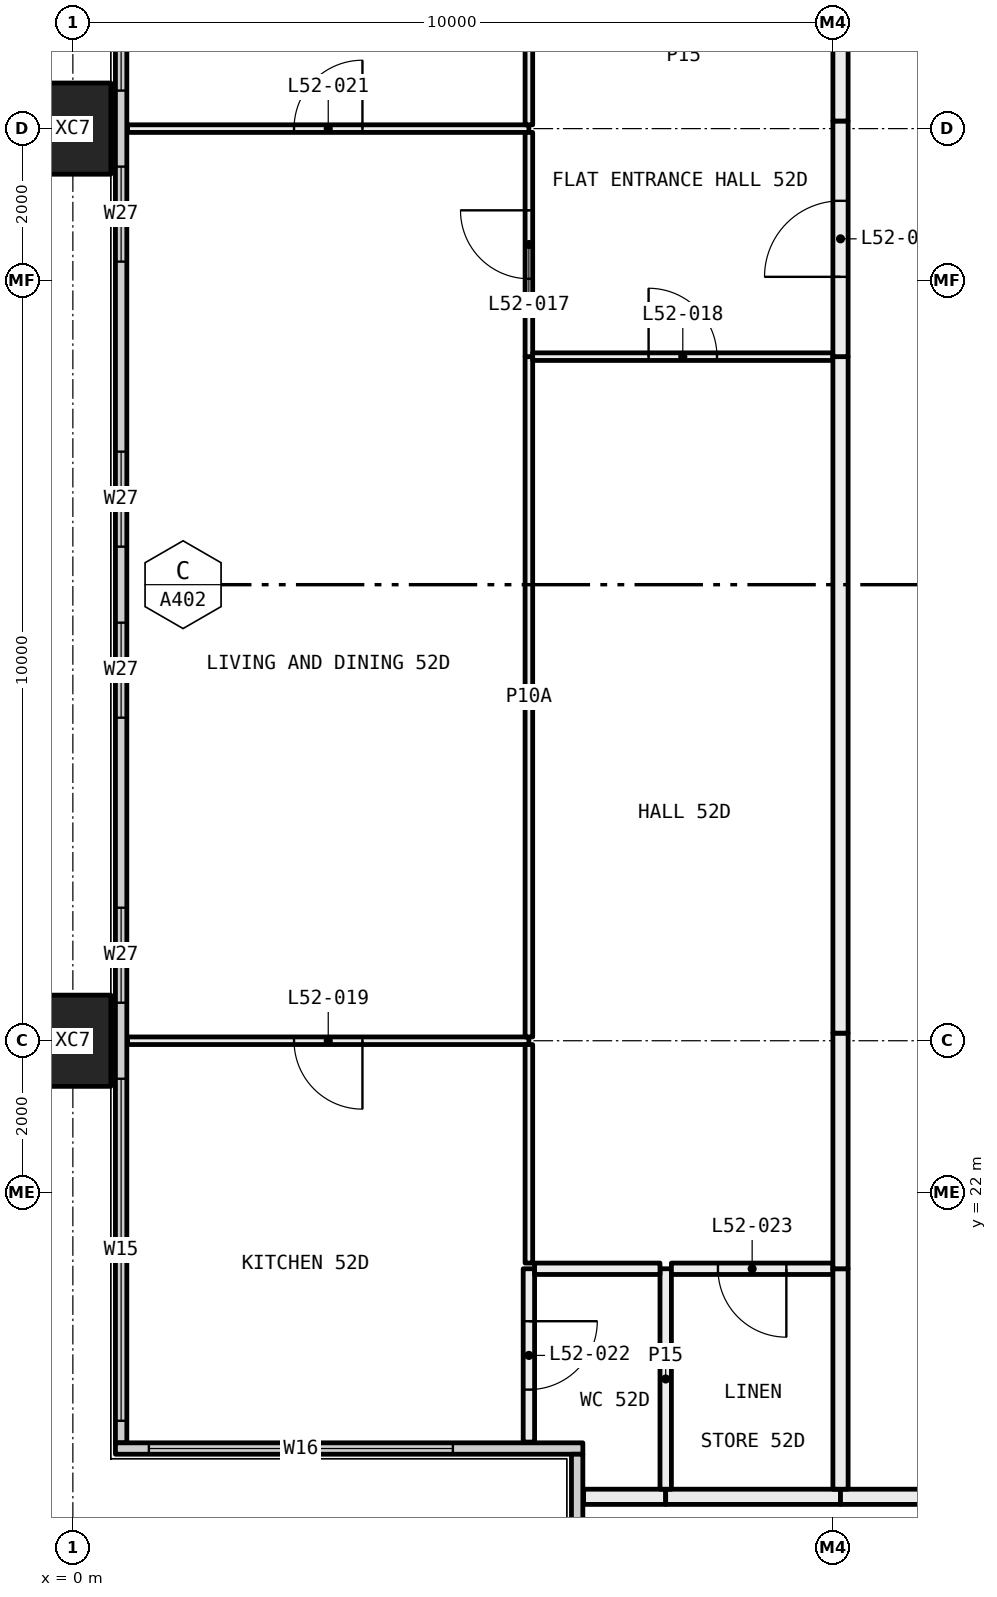
"""IFC4 building model, lengths in metres.
Left out: names, types, materials, properties, quantities, classifications, styles, units other than length and angle.
Written with IfcOpenShell. Run it as: python <this file> out.ifc"""

import sys

from ifc_helpers import new_model, si_unit, direction, frame, frame_2d, origin, origin_2d, place, context, subcontext, project, spatial, rectangle, hollow_rectangle, extrude, element, fill, save


model = new_model("IFC4")
c1 = context("Model", 3, precision=1e-05, world=origin(), true_north=direction((0.0, 1.0)))
c2 = subcontext(c1, "Body", "Model", "MODEL_VIEW")
j1 = project(units=[si_unit("LENGTHUNIT", "METRE"), si_unit("PLANEANGLEUNIT", "RADIAN")], contexts=[c1])
p1 = place(None, origin())
s1 = spatial("IfcSite", under=j1, at=p1, CompositionType="ELEMENT")
p2 = place(p1, origin())
s2 = spatial("IfcBuilding", under=s1, at=p2, CompositionType="ELEMENT")
p3 = place(p2, frame((0.0, 0.0, 196.2)))
s3 = spatial("IfcBuildingStorey", under=s2, at=p3, CompositionType="ELEMENT", Elevation=196.2)
for number, where, z_axis, x_axis in (
    (1, (0.0, 24.0, -0.4), (0.0, 0.0, 1.0), (0.0, 1.0, 0.0)),
    (2, (0.0, 36.0, -0.4), (0.0, 0.0, 1.0), (0.0, 1.0, 0.0)),
):
    element("IfcColumn", number, at=place(p3, frame(where, z_axis=z_axis, x_axis=x_axis)), inside=s3, PredefinedType="COLUMN", context=c2, shape_type="SweptSolid", body=[
        extrude(hollow_rectangle(XDim=1.2, YDim=1.0, WallThickness=0.045, at=origin_2d()), origin(), (0.0, 0.0, 1.0), 3.45),
    ])
p4 = place(p3, frame((0.635, 18.71, 0.0), z_axis=(0.0, 0.0, 1.0), x_axis=(0.0, 1.0, 0.0)))
e3 = element("IfcWall", 3, at=p4, inside=s3, PredefinedType="ELEMENTEDWALL", context=c2, shape_type="SweptSolid", body=[
    extrude(rectangle(XDim=22.58, YDim=0.15, at=frame_2d((11.29, 0.0))), origin(), (0.0, 0.0, 1.0), 3.05),
])
p5 = place(p4, frame((0.29, 0.0, 0.45)))
e4 = element("IfcOpeningElement", 4, at=p5, cuts=e3, PredefinedType="OPENING", context=c2, shape_type="SweptSolid", body=[
    extrude(rectangle(XDim=4.5, YDim=2.55, at=frame_2d((2.25, 1.275))), frame((0.0, 0.085, 0.0), z_axis=(0.0, -1.0, 0.0), x_axis=(1.0, 0.0, 0.0)), (0.0, 0.0, 1.0), 0.17),
])
p6 = place(p4, frame((5.79, 0.0, 0.45)))
e5 = element("IfcOpeningElement", 5, at=p6, cuts=e3, PredefinedType="OPENING", context=c2, shape_type="SweptSolid", body=[
    extrude(rectangle(XDim=1.25, YDim=2.55, at=frame_2d((0.625, 1.275))), frame((0.0, 0.085, 0.0), z_axis=(0.0, -1.0, 0.0), x_axis=(1.0, 0.0, 0.0)), (0.0, 0.0, 1.0), 0.17),
])
p7 = place(p4, frame((9.54, 0.0, 0.45)))
e6 = element("IfcOpeningElement", 6, at=p7, cuts=e3, PredefinedType="OPENING", context=c2, shape_type="SweptSolid", body=[
    extrude(rectangle(XDim=1.25, YDim=2.55, at=frame_2d((0.625, 1.275))), frame((0.0, 0.085, 0.0), z_axis=(0.0, -1.0, 0.0), x_axis=(1.0, 0.0, 0.0)), (0.0, 0.0, 1.0), 0.17),
])
p8 = place(p4, frame((11.79, 0.0, 0.45)))
e7 = element("IfcOpeningElement", 7, at=p8, cuts=e3, PredefinedType="OPENING", context=c2, shape_type="SweptSolid", body=[
    extrude(rectangle(XDim=1.25, YDim=2.55, at=frame_2d((0.625, 1.275))), frame((0.0, 0.085, 0.0), z_axis=(0.0, -1.0, 0.0), x_axis=(1.0, 0.0, 0.0)), (0.0, 0.0, 1.0), 0.17),
])
p9 = place(p4, frame((15.54, 0.0, 0.45)))
e8 = element("IfcOpeningElement", 8, at=p9, cuts=e3, PredefinedType="OPENING", context=c2, shape_type="SweptSolid", body=[
    extrude(rectangle(XDim=1.25, YDim=2.55, at=frame_2d((0.625, 1.275))), frame((0.0, 0.085, 0.0), z_axis=(0.0, -1.0, 0.0), x_axis=(1.0, 0.0, 0.0)), (0.0, 0.0, 1.0), 0.17),
])
p10 = place(p4, frame((17.79, 0.0, 0.45)))
e9 = element("IfcOpeningElement", 9, at=p10, cuts=e3, PredefinedType="OPENING", context=c2, shape_type="SweptSolid", body=[
    extrude(rectangle(XDim=4.5, YDim=2.55, at=frame_2d((2.25, 1.275))), frame((0.0, 0.085, 0.0), z_axis=(0.0, -1.0, 0.0), x_axis=(1.0, 0.0, 0.0)), (0.0, 0.0, 1.0), 0.17),
])
p11 = place(p3, frame((0.56, 18.635, 0.0), z_axis=(0.0, 0.0, 1.0), x_axis=(1.0, 0.0, 0.0)))
e10 = element("IfcWall", 10, at=p11, inside=s3, PredefinedType="ELEMENTEDWALL", context=c2, shape_type="SweptSolid", body=[
    extrude(rectangle(XDim=6.15, YDim=0.15, at=frame_2d((3.075, 0.0))), origin(), (0.0, 0.0, 1.0), 3.05),
])
p12 = place(p11, frame((0.44, 0.0, 0.45)))
e11 = element("IfcOpeningElement", 11, at=p12, cuts=e10, PredefinedType="OPENING", context=c2, shape_type="SweptSolid", body=[
    extrude(rectangle(XDim=4.0, YDim=2.55, at=frame_2d((2.0, 1.275))), frame((0.0, 0.085, 0.0), z_axis=(0.0, -1.0, 0.0), x_axis=(1.0, 0.0, 0.0)), (0.0, 0.0, 1.0), 0.17),
])
p13 = place(p3, frame((6.635, 12.71, 0.0), z_axis=(0.0, 0.0, 1.0), x_axis=(0.0, 1.0, 0.0)))
e12 = element("IfcWall", 12, at=p13, inside=s3, PredefinedType="ELEMENTEDWALL", context=c2, shape_type="SweptSolid", body=[
    extrude(rectangle(XDim=5.85, YDim=0.15, at=frame_2d((2.925, 0.0))), origin(), (0.0, 0.0, 1.0), 3.05),
])
p14 = place(p13, frame((0.29, 0.0, 0.45)))
e13 = element("IfcOpeningElement", 13, at=p14, cuts=e12, PredefinedType="OPENING", context=c2, shape_type="SweptSolid", body=[
    extrude(rectangle(XDim=4.0, YDim=2.55, at=frame_2d((2.0, 1.275))), frame((0.0, 0.085, 0.0), z_axis=(0.0, -1.0, 0.0), x_axis=(1.0, 0.0, 0.0)), (0.0, 0.0, 1.0), 0.17),
])
p15 = place(p3, frame((7.8, 18.0, 0.0), z_axis=(0.0, 0.0, 1.0), x_axis=(-1.0, 0.0, 0.0)))
e14 = element("IfcWall", 14, at=p15, inside=s3, PredefinedType="PARTITIONING", context=c2, shape_type="SweptSolid", body=[
    extrude(rectangle(XDim=1.08, YDim=0.2, at=frame_2d((0.54, 0.0))), origin(), (0.0, 0.0, 1.0), 3.05),
])
p16 = place(p3, frame((10.1, 18.0, 0.0), z_axis=(0.0, 0.0, 1.0), x_axis=(-1.0, 0.0, 0.0)))
e15 = element("IfcWall", 15, at=p16, inside=s3, PredefinedType="PARTITIONING", context=c2, shape_type="SweptSolid", body=[
    extrude(rectangle(XDim=2.3, YDim=0.2, at=frame_2d((1.15, 0.0))), origin(), (0.0, 0.0, 1.0), 3.05),
])
p17 = place(p3, frame((12.0, 18.0, 0.0), z_axis=(0.0, 0.0, 1.0), x_axis=(-1.0, 0.0, 0.0)))
e16 = element("IfcWall", 16, at=p17, inside=s3, PredefinedType="PARTITIONING", context=c2, shape_type="SweptSolid", body=[
    extrude(rectangle(XDim=1.9, YDim=0.2, at=frame_2d((0.95, 0.0))), origin(), (0.0, 0.0, 1.0), 3.05),
])
p18 = place(p3, frame((6.0, 24.0, 0.0), z_axis=(0.0, 0.0, 1.0), x_axis=(-1.0, 0.0, 0.0)))
e17 = element("IfcWall", 17, at=p18, inside=s3, PredefinedType="PARTITIONING", context=c2, shape_type="SweptSolid", body=[
    extrude(rectangle(XDim=5.28, YDim=0.1, at=frame_2d((2.64, 0.0))), origin(), (0.0, 0.0, 1.0), 2.45),
])
p19 = place(p18, frame((2.19, 0.0, 0.0)))
e18 = element("IfcOpeningElement", 18, at=p19, cuts=e17, PredefinedType="OPENING", context=c2, shape_type="SweptSolid", body=[
    extrude(rectangle(XDim=0.9, YDim=2.1, at=frame_2d((0.45, 1.05))), frame((0.0, 0.06, 0.0), z_axis=(0.0, -1.0, 0.0), x_axis=(1.0, 0.0, 0.0)), (0.0, 0.0, 1.0), 0.12),
])
p20 = place(p3, frame((6.0, 18.72, 0.0), z_axis=(0.0, 0.0, 1.0), x_axis=(0.0, 1.0, 0.0)))
e19 = element("IfcWall", 19, at=p20, inside=s3, PredefinedType="PARTITIONING", context=c2, shape_type="SweptSolid", body=[
    extrude(rectangle(XDim=2.28, YDim=0.15, at=frame_2d((1.14, 0.0))), origin(), (0.0, 0.0, 1.0), 3.05),
])
p21 = place(p20, frame((0.69, 0.0, 0.0)))
e20 = element("IfcOpeningElement", 20, at=p21, cuts=e19, PredefinedType="OPENING", context=c2, shape_type="SweptSolid", body=[
    extrude(rectangle(XDim=0.9, YDim=2.1, at=frame_2d((0.45, 1.05))), frame((0.0, 0.085, 0.0), z_axis=(0.0, -1.0, 0.0), x_axis=(1.0, 0.0, 0.0)), (0.0, 0.0, 1.0), 0.17),
])
p22 = place(p3, frame((6.0, 21.075, 0.0), z_axis=(0.0, 0.0, 1.0), x_axis=(0.0, 1.0, 0.0)))
e21 = element("IfcWall", 21, at=p22, inside=s3, PredefinedType="PARTITIONING", context=c2, shape_type="SweptSolid", body=[
    extrude(rectangle(XDim=2.875, YDim=0.1, at=frame_2d((1.438, 0.0))), origin(), (0.0, 0.0, 1.0), 2.45),
])
p23 = place(p3, frame((6.0, 36.0, 0.0), z_axis=(0.0, 0.0, 1.0), x_axis=(-1.0, 0.0, 0.0)))
e22 = element("IfcWall", 22, at=p23, inside=s3, PredefinedType="PARTITIONING", context=c2, shape_type="SweptSolid", body=[
    extrude(rectangle(XDim=5.28, YDim=0.1, at=frame_2d((2.64, 0.0))), origin(), (0.0, 0.0, 1.0), 2.45),
])
p24 = place(p23, frame((2.19, 0.0, 0.0)))
e23 = element("IfcOpeningElement", 23, at=p24, cuts=e22, PredefinedType="OPENING", context=c2, shape_type="SweptSolid", body=[
    extrude(rectangle(XDim=0.9, YDim=2.1, at=frame_2d((0.45, 1.05))), frame((0.0, 0.06, 0.0), z_axis=(0.0, -1.0, 0.0), x_axis=(1.0, 0.0, 0.0)), (0.0, 0.0, 1.0), 0.12),
])
p25 = place(p3, frame((6.0, 24.05, 0.0), z_axis=(0.0, 0.0, 1.0), x_axis=(0.0, 1.0, 0.0)))
e24 = element("IfcWall", 24, at=p25, inside=s3, PredefinedType="PARTITIONING", context=c2, shape_type="SweptSolid", body=[
    extrude(rectangle(XDim=8.95, YDim=0.1, at=frame_2d((4.475, 0.0))), origin(), (0.0, 0.0, 1.0), 2.45),
])
p26 = place(p3, frame((6.0, 33.0, 0.0), z_axis=(0.0, 0.0, 1.0), x_axis=(0.0, 1.0, 0.0)))
e25 = element("IfcWall", 25, at=p26, inside=s3, PredefinedType="PARTITIONING", context=c2, shape_type="SweptSolid", body=[
    extrude(rectangle(XDim=2.95, YDim=0.1, at=frame_2d((1.475, 0.0))), origin(), (0.0, 0.0, 1.0), 2.45),
])
p27 = place(p26, frame((1.025, 0.0, 0.0)))
e26 = element("IfcOpeningElement", 26, at=p27, cuts=e25, PredefinedType="OPENING", context=c2, shape_type="SweptSolid", body=[
    extrude(rectangle(XDim=0.9, YDim=2.1, at=frame_2d((0.45, 1.05))), frame((0.0, 0.06, 0.0), z_axis=(0.0, -1.0, 0.0), x_axis=(1.0, 0.0, 0.0)), (0.0, 0.0, 1.0), 0.12),
])
p28 = place(p3, frame((6.0, 36.05, 0.0), z_axis=(0.0, 0.0, 1.0), x_axis=(0.0, 1.0, 0.0)))
e27 = element("IfcWall", 27, at=p28, inside=s3, PredefinedType="PARTITIONING", context=c2, shape_type="SweptSolid", body=[
    extrude(rectangle(XDim=1.375, YDim=0.1, at=frame_2d((0.688, 0.0))), origin(), (0.0, 0.0, 1.0), 2.45),
])
p29 = place(p3, frame((7.8, 18.1, 0.0), z_axis=(0.0, 0.0, 1.0), x_axis=(0.0, 1.0, 0.0)))
e28 = element("IfcWall", 28, at=p29, inside=s3, PredefinedType="PARTITIONING", context=c2, shape_type="SweptSolid", body=[
    extrude(rectangle(XDim=2.9, YDim=0.15, at=frame_2d((1.45, 0.0))), origin(), (0.0, 0.0, 1.0), 3.05),
])
p30 = place(p3, frame((7.725, 21.0, 0.0), z_axis=(0.0, 0.0, 1.0), x_axis=(-1.0, 0.0, 0.0)))
e29 = element("IfcWall", 29, at=p30, inside=s3, PredefinedType="PARTITIONING", context=c2, shape_type="SweptSolid", body=[
    extrude(rectangle(XDim=1.65, YDim=0.15, at=frame_2d((0.825, 0.0))), origin(), (0.0, 0.0, 1.0), 3.05),
])
p31 = place(p3, frame((10.0, 21.0, 0.0), z_axis=(0.0, 0.0, 1.0), x_axis=(-1.0, 0.0, 0.0)))
e30 = element("IfcWall", 30, at=p31, inside=s3, PredefinedType="PARTITIONING", context=c2, shape_type="SweptSolid", body=[
    extrude(rectangle(XDim=2.125, YDim=0.15, at=frame_2d((1.062, 0.0))), origin(), (0.0, 0.0, 1.0), 3.05),
])
p32 = place(p31, frame((0.613, 0.0, 0.0)))
e31 = element("IfcOpeningElement", 31, at=p32, cuts=e30, PredefinedType="OPENING", context=c2, shape_type="SweptSolid", body=[
    extrude(rectangle(XDim=0.9, YDim=2.1, at=frame_2d((0.45, 1.05))), frame((0.0, 0.085, 0.0), z_axis=(0.0, -1.0, 0.0), x_axis=(1.0, 0.0, 0.0)), (0.0, 0.0, 1.0), 0.17),
])
p33 = place(p3, frame((10.1, 18.1, 0.0), z_axis=(0.0, 0.0, 1.0), x_axis=(0.0, 1.0, 0.0)))
e32 = element("IfcWall", 32, at=p33, inside=s3, PredefinedType="PARTITIONING", context=c2, shape_type="SweptSolid", body=[
    extrude(rectangle(XDim=2.9, YDim=0.2, at=frame_2d((1.45, 0.0))), origin(), (0.0, 0.0, 1.0), 3.05),
])
p34 = place(p3, frame((10.0, 33.0, 0.0), z_axis=(0.0, 0.0, 1.0), x_axis=(-1.0, 0.0, 0.0)))
e33 = element("IfcWall", 33, at=p34, inside=s3, PredefinedType="PARTITIONING", context=c2, shape_type="SweptSolid", body=[
    extrude(rectangle(XDim=3.95, YDim=0.1, at=frame_2d((1.975, 0.0))), origin(), (0.0, 0.0, 1.0), 3.05),
])
p35 = place(p34, frame((1.525, 0.0, 0.0)))
e34 = element("IfcOpeningElement", 34, at=p35, cuts=e33, PredefinedType="OPENING", context=c2, shape_type="SweptSolid", body=[
    extrude(rectangle(XDim=0.9, YDim=2.1, at=frame_2d((0.45, 1.05))), frame((0.0, 0.06, 0.0), z_axis=(0.0, -1.0, 0.0), x_axis=(1.0, 0.0, 0.0)), (0.0, 0.0, 1.0), 0.12),
])
p36 = place(p3, frame((10.1, 21.0, 0.0), z_axis=(0.0, 0.0, 1.0), x_axis=(0.0, 1.0, 0.0)))
e35 = element("IfcWall", 35, at=p36, inside=s3, PredefinedType="PARTITIONING", context=c2, shape_type="SweptSolid", body=[
    extrude(rectangle(XDim=3.1, YDim=0.2, at=frame_2d((1.55, 0.0))), origin(), (0.0, 0.0, 1.0), 2.45),
])
p37 = place(p3, frame((10.1, 24.1, 0.0), z_axis=(0.0, 0.0, 1.0), x_axis=(0.0, 1.0, 0.0)))
e36 = element("IfcWall", 36, at=p37, inside=s3, PredefinedType="PARTITIONING", context=c2, shape_type="SweptSolid", body=[
    extrude(rectangle(XDim=8.9, YDim=0.2, at=frame_2d((4.45, 0.0))), origin(), (0.0, 0.0, 1.0), 3.05),
])
p38 = place(p3, frame((10.1, 33.0, 0.0), z_axis=(0.0, 0.0, 1.0), x_axis=(0.0, 1.0, 0.0)))
e37 = element("IfcWall", 37, at=p38, inside=s3, PredefinedType="PARTITIONING", context=c2, shape_type="SweptSolid", body=[
    extrude(rectangle(XDim=3.1, YDim=0.2, at=frame_2d((1.55, 0.0))), origin(), (0.0, 0.0, 1.0), 2.45),
])
p39 = place(p38, frame((1.05, 0.0, 0.0)))
e38 = element("IfcOpeningElement", 38, at=p39, cuts=e37, PredefinedType="OPENING", context=c2, shape_type="SweptSolid", body=[
    extrude(rectangle(XDim=1.0, YDim=2.1, at=frame_2d((0.5, 1.05))), frame((0.0, 0.11, 0.0), z_axis=(0.0, -1.0, 0.0), x_axis=(1.0, 0.0, 0.0)), (0.0, 0.0, 1.0), 0.22),
])
p40 = place(p3, frame((10.1, 36.1, 0.0), z_axis=(0.0, 0.0, 1.0), x_axis=(0.0, 1.0, 0.0)))
e39 = element("IfcWall", 39, at=p40, inside=s3, PredefinedType="PARTITIONING", context=c2, shape_type="SweptSolid", body=[
    extrude(rectangle(XDim=1.4, YDim=0.2, at=frame_2d((0.7, 0.0))), origin(), (0.0, 0.0, 1.0), 3.05),
])
p41 = place(p5, origin())
e40 = element("IfcWindow", 40, at=p41, inside=s3, PartitioningType="SINGLE_PANEL", PredefinedType="WINDOW", context=c2, shape_type="SweptSolid", body=[
    extrude(rectangle(XDim=4.5, YDim=2.55, at=frame_2d((2.25, 1.275))), frame((0.0, 0.03, 0.0), z_axis=(0.0, -1.0, 0.0), x_axis=(1.0, 0.0, 0.0)), (0.0, 0.0, 1.0), 0.06),
])
fill(e4, e40)
p42 = place(p6, origin())
e41 = element("IfcWindow", 41, at=p42, inside=s3, PartitioningType="SINGLE_PANEL", PredefinedType="WINDOW", context=c2, shape_type="SweptSolid", body=[
    extrude(rectangle(XDim=1.25, YDim=2.55, at=frame_2d((0.625, 1.275))), frame((0.0, 0.03, 0.0), z_axis=(0.0, -1.0, 0.0), x_axis=(1.0, 0.0, 0.0)), (0.0, 0.0, 1.0), 0.06),
])
fill(e5, e41)
p43 = place(p7, origin())
e42 = element("IfcWindow", 42, at=p43, inside=s3, PartitioningType="SINGLE_PANEL", PredefinedType="WINDOW", context=c2, shape_type="SweptSolid", body=[
    extrude(rectangle(XDim=1.25, YDim=2.55, at=frame_2d((0.625, 1.275))), frame((0.0, 0.03, 0.0), z_axis=(0.0, -1.0, 0.0), x_axis=(1.0, 0.0, 0.0)), (0.0, 0.0, 1.0), 0.06),
])
fill(e6, e42)
p44 = place(p8, origin())
e43 = element("IfcWindow", 43, at=p44, inside=s3, PartitioningType="SINGLE_PANEL", PredefinedType="WINDOW", context=c2, shape_type="SweptSolid", body=[
    extrude(rectangle(XDim=1.25, YDim=2.55, at=frame_2d((0.625, 1.275))), frame((0.0, 0.03, 0.0), z_axis=(0.0, -1.0, 0.0), x_axis=(1.0, 0.0, 0.0)), (0.0, 0.0, 1.0), 0.06),
])
fill(e7, e43)
p45 = place(p9, origin())
e44 = element("IfcWindow", 44, at=p45, inside=s3, PartitioningType="SINGLE_PANEL", PredefinedType="WINDOW", context=c2, shape_type="SweptSolid", body=[
    extrude(rectangle(XDim=1.25, YDim=2.55, at=frame_2d((0.625, 1.275))), frame((0.0, 0.03, 0.0), z_axis=(0.0, -1.0, 0.0), x_axis=(1.0, 0.0, 0.0)), (0.0, 0.0, 1.0), 0.06),
])
fill(e8, e44)
p46 = place(p10, origin())
e45 = element("IfcWindow", 45, at=p46, inside=s3, PartitioningType="SINGLE_PANEL", PredefinedType="WINDOW", context=c2, shape_type="SweptSolid", body=[
    extrude(rectangle(XDim=4.5, YDim=2.55, at=frame_2d((2.25, 1.275))), frame((0.0, 0.03, 0.0), z_axis=(0.0, -1.0, 0.0), x_axis=(1.0, 0.0, 0.0)), (0.0, 0.0, 1.0), 0.06),
])
fill(e9, e45)
p47 = place(p12, origin())
e46 = element("IfcWindow", 46, at=p47, inside=s3, PartitioningType="SINGLE_PANEL", PredefinedType="WINDOW", context=c2, shape_type="SweptSolid", body=[
    extrude(rectangle(XDim=4.0, YDim=2.55, at=frame_2d((2.0, 1.275))), frame((0.0, 0.03, 0.0), z_axis=(0.0, -1.0, 0.0), x_axis=(1.0, 0.0, 0.0)), (0.0, 0.0, 1.0), 0.06),
])
fill(e11, e46)
p48 = place(p39, origin())
e47 = element("IfcDoor", 47, at=p48, inside=s3, OperationType="SINGLE_SWING_RIGHT", PredefinedType="DOOR", context=c2, shape_type="SweptSolid", body=[
    extrude(rectangle(XDim=1.0, YDim=2.1, at=frame_2d((0.5, 1.05))), frame((0.0, 0.025, 0.0), z_axis=(0.0, -1.0, 0.0), x_axis=(1.0, 0.0, 0.0)), (0.0, 0.0, 1.0), 0.05),
])
fill(e38, e47)
p49 = place(p27, origin())
e48 = element("IfcDoor", 48, at=p49, inside=s3, OperationType="SINGLE_SWING_LEFT", PredefinedType="DOOR", context=c2, shape_type="SweptSolid", body=[
    extrude(rectangle(XDim=0.9, YDim=2.1, at=frame_2d((0.45, 1.05))), frame((0.0, 0.025, 0.0), z_axis=(0.0, -1.0, 0.0), x_axis=(1.0, 0.0, 0.0)), (0.0, 0.0, 1.0), 0.05),
])
fill(e26, e48)
p50 = place(p35, frame((0.9, 0.0, 0.0), x_axis=(-1.0, 0.0, 0.0)))
e49 = element("IfcDoor", 49, at=p50, inside=s3, OperationType="SINGLE_SWING_RIGHT", PredefinedType="DOOR", context=c2, shape_type="SweptSolid", body=[
    extrude(rectangle(XDim=0.9, YDim=2.1, at=frame_2d((0.45, 1.05))), frame((0.0, 0.025, 0.0), z_axis=(0.0, -1.0, 0.0), x_axis=(1.0, 0.0, 0.0)), (0.0, 0.0, 1.0), 0.05),
])
fill(e34, e49)
p51 = place(p19, origin())
e50 = element("IfcDoor", 50, at=p51, inside=s3, OperationType="SINGLE_SWING_RIGHT", PredefinedType="DOOR", context=c2, shape_type="SweptSolid", body=[
    extrude(rectangle(XDim=0.9, YDim=2.1, at=frame_2d((0.45, 1.05))), frame((0.0, 0.025, 0.0), z_axis=(0.0, -1.0, 0.0), x_axis=(1.0, 0.0, 0.0)), (0.0, 0.0, 1.0), 0.05),
])
fill(e18, e50)
p52 = place(p24, frame((0.9, 0.0, 0.0), x_axis=(-1.0, 0.0, 0.0)))
e51 = element("IfcDoor", 51, at=p52, inside=s3, OperationType="SINGLE_SWING_LEFT", PredefinedType="DOOR", context=c2, shape_type="SweptSolid", body=[
    extrude(rectangle(XDim=0.9, YDim=2.1, at=frame_2d((0.45, 1.05))), frame((0.0, 0.025, 0.0), z_axis=(0.0, -1.0, 0.0), x_axis=(1.0, 0.0, 0.0)), (0.0, 0.0, 1.0), 0.05),
])
fill(e23, e51)
p53 = place(p21, frame((0.9, 0.0, 0.0), x_axis=(-1.0, 0.0, 0.0)))
e52 = element("IfcDoor", 52, at=p53, inside=s3, OperationType="SINGLE_SWING_RIGHT", PredefinedType="DOOR", context=c2, shape_type="SweptSolid", body=[
    extrude(rectangle(XDim=0.9, YDim=2.1, at=frame_2d((0.45, 1.05))), frame((0.0, 0.025, 0.0), z_axis=(0.0, -1.0, 0.0), x_axis=(1.0, 0.0, 0.0)), (0.0, 0.0, 1.0), 0.05),
])
fill(e20, e52)
p54 = place(p32, origin())
e53 = element("IfcDoor", 53, at=p54, inside=s3, OperationType="SINGLE_SWING_RIGHT", PredefinedType="DOOR", context=c2, shape_type="SweptSolid", body=[
    extrude(rectangle(XDim=0.9, YDim=2.1, at=frame_2d((0.45, 1.05))), frame((0.0, 0.025, 0.0), z_axis=(0.0, -1.0, 0.0), x_axis=(1.0, 0.0, 0.0)), (0.0, 0.0, 1.0), 0.05),
])
fill(e31, e53)
save(model, sys.argv[1])
